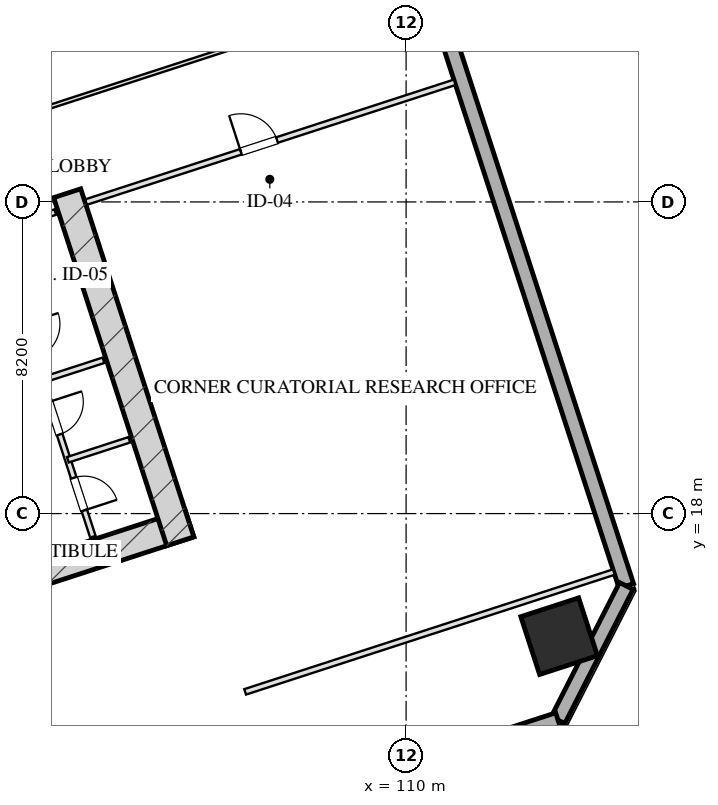
"""IFC4 building model, lengths in metres.
Left out: names, types, materials, properties, quantities, classifications, styles, units other than length and angle.
Written with IfcOpenShell. Run it as: python <this file> out.ifc"""

import sys

from ifc_helpers import new_model, si_unit, direction, frame, frame_2d, origin, origin_2d, place, context, subcontext, project, spatial, rectangle, hollow_rectangle, extrude, element, fill, save


model = new_model("IFC4")
c1 = context("Model", 3, precision=1e-05, world=origin(), true_north=direction((0.0, 1.0)))
c2 = subcontext(c1, "Body", "Model", "MODEL_VIEW")
j1 = project(units=[si_unit("LENGTHUNIT", "METRE"), si_unit("PLANEANGLEUNIT", "RADIAN")], contexts=[c1])
p1 = place(None, origin())
s1 = spatial("IfcSite", under=j1, at=p1, CompositionType="ELEMENT")
p2 = place(p1, origin())
s2 = spatial("IfcBuilding", under=s1, at=p2, CompositionType="ELEMENT")
p3 = place(p2, frame((0.0, 0.0, 50.6)))
s3 = spatial("IfcBuildingStorey", under=s2, at=p3, CompositionType="ELEMENT", Elevation=50.6)
p4 = place(p3, frame((88.559, 12.629, 0.0), z_axis=(0.0, 0.0, 1.0), x_axis=(0.951056072937, 0.309018358888, 0.0)))
e1 = element("IfcWall", 1, at=p4, inside=s3, PredefinedType="SHEAR", context=c2, shape_type="SweptSolid", body=[
    extrude(rectangle(XDim=16.55, YDim=0.75, at=frame_2d((8.275, 0.0))), origin(), (0.0, 0.0, 1.0), 3.45),
])
p5 = place(p3, frame((101.082, 26.429, 0.0), z_axis=(0.0, 0.0, 1.0), x_axis=(0.309016134813, -0.951056795583, 0.0)))
e2 = element("IfcWall", 2, at=p5, inside=s3, PredefinedType="SHEAR", context=c2, shape_type="SweptSolid", body=[
    extrude(rectangle(XDim=9.63, YDim=0.75, at=frame_2d((4.815, 0.0))), origin(), (0.0, 0.0, 1.0), 3.45),
])
p6 = place(p3, frame((114.027, 14.774, 0.0), z_axis=(0.0, 0.0, 1.0), x_axis=(0.951056516295, 0.309016994375, 0.0)))
e3 = element("IfcColumn", 3, at=p6, inside=s3, PredefinedType="COLUMN", context=c2, shape_type="SweptSolid", body=[
    extrude(hollow_rectangle(XDim=1.6, YDim=1.6, WallThickness=0.055, at=origin_2d()), origin(), (0.0, 0.0, 1.0), 3.451),
])
p7 = place(p3, frame((100.345, 63.648, 0.0), z_axis=(0.0, 0.0, 1.0), x_axis=(0.309014526607, -0.951057318118, 0.0)))
e4 = element("IfcWall", 4, at=p7, inside=s3, PredefinedType="SOLIDWALL", context=c2, shape_type="SweptSolid", body=[
    extrude(rectangle(XDim=50.0, YDim=0.4, at=frame_2d((25.0, 0.0))), origin(), (0.0, 0.0, 1.0), 2.61),
])
p8 = place(p7, frame((30.15, 0.0, 0.75)))
e5 = element("IfcOpeningElement", 5, at=p8, cuts=e4, PredefinedType="OPENING", context=c2, shape_type="SweptSolid", body=[
    extrude(rectangle(XDim=2.5, YDim=1.46, at=frame_2d((1.25, 0.73))), frame((0.0, 0.21, 0.0), z_axis=(0.0, -1.0, 0.0), x_axis=(1.0, 0.0, 0.0)), (0.0, 0.0, 1.0), 0.42),
])
p9 = place(p7, frame((18.65, 0.0, 0.0)))
e6 = element("IfcOpeningElement", 6, at=p9, cuts=e4, PredefinedType="OPENING", context=c2, shape_type="SweptSolid", body=[
    extrude(rectangle(XDim=1.1, YDim=2.15, at=frame_2d((0.55, 1.075))), frame((0.0, 0.21, 0.0), z_axis=(0.0, -1.0, 0.0), x_axis=(1.0, 0.0, 0.0)), (0.0, 0.0, 1.0), 0.42),
])
p10 = place(p3, frame((115.795, 16.095, 0.0), z_axis=(0.0, 0.0, 1.0), x_axis=(-0.453958106755, -0.891023028497, 0.0)))
e7 = element("IfcWall", 7, at=p10, inside=s3, PredefinedType="SOLIDWALL", context=c2, shape_type="SweptSolid", body=[
    extrude(rectangle(XDim=3.96, YDim=0.4, at=frame_2d((1.98, 0.0))), origin(), (0.0, 0.0, 1.0), 2.61),
])
p11 = place(p3, frame((113.998, 12.567, 0.0), z_axis=(0.0, 0.0, 1.0), x_axis=(-0.951055939317, -0.309018770125, 0.0)))
e8 = element("IfcWall", 8, at=p11, inside=s3, PredefinedType="SOLIDWALL", context=c2, shape_type="SweptSolid", body=[
    extrude(rectangle(XDim=32.4, YDim=0.4, at=frame_2d((16.2, 0.0))), origin(), (0.0, 0.0, 1.0), 2.61),
])
p12 = place(p3, frame((97.727, 24.944, 0.0), z_axis=(0.0, 0.0, 1.0), x_axis=(0.951036872128, 0.309077446369, 0.0)))
e9 = element("IfcWall", 9, at=p12, inside=s3, PredefinedType="PARTITIONING", context=c2, shape_type="SweptSolid", body=[
    extrude(rectangle(XDim=3.2, YDim=0.15, at=frame_2d((1.6, 0.0))), origin(), (0.0, 0.0, 1.0), 3.175),
])
p13 = place(p12, frame((0.22, 0.0, 0.0)))
e10 = element("IfcOpeningElement", 10, at=p13, cuts=e9, PredefinedType="OPENING", context=c2, shape_type="SweptSolid", body=[
    extrude(rectangle(XDim=0.95, YDim=2.05, at=frame_2d((0.475, 1.025))), frame((0.0, 0.085, 0.0), z_axis=(0.0, -1.0, 0.0), x_axis=(1.0, 0.0, 0.0)), (0.0, 0.0, 1.0), 0.17),
])
p14 = place(p3, frame((99.153, 25.408, 0.0), z_axis=(0.0, 0.0, 1.0), x_axis=(0.309016001439, -0.951056838919, 0.0)))
e11 = element("IfcWall", 11, at=p14, inside=s3, PredefinedType="PARTITIONING", context=c2, shape_type="SweptSolid", body=[
    extrude(rectangle(XDim=8.43, YDim=0.15, at=frame_2d((4.215, 0.0))), origin(), (0.0, 0.0, 1.0), 3.175),
])
p15 = place(p14, frame((2.55, 0.0, 0.0)))
e12 = element("IfcOpeningElement", 12, at=p15, cuts=e11, PredefinedType="OPENING", context=c2, shape_type="SweptSolid", body=[
    extrude(rectangle(XDim=0.95, YDim=2.05, at=frame_2d((0.475, 1.025))), frame((0.0, 0.085, 0.0), z_axis=(0.0, -1.0, 0.0), x_axis=(1.0, 0.0, 0.0)), (0.0, 0.0, 1.0), 0.17),
])
p16 = place(p14, frame((4.7, 0.0, 0.0)))
e13 = element("IfcOpeningElement", 13, at=p16, cuts=e11, PredefinedType="OPENING", context=c2, shape_type="SweptSolid", body=[
    extrude(rectangle(XDim=0.9, YDim=2.05, at=frame_2d((0.45, 1.025))), frame((0.0, 0.085, 0.0), z_axis=(0.0, -1.0, 0.0), x_axis=(1.0, 0.0, 0.0)), (0.0, 0.0, 1.0), 0.17),
])
p17 = place(p14, frame((6.8, 0.0, 0.0)))
e14 = element("IfcOpeningElement", 14, at=p17, cuts=e11, PredefinedType="OPENING", context=c2, shape_type="SweptSolid", body=[
    extrude(rectangle(XDim=0.9, YDim=2.05, at=frame_2d((0.45, 1.025))), frame((0.0, 0.085, 0.0), z_axis=(0.0, -1.0, 0.0), x_axis=(1.0, 0.0, 0.0)), (0.0, 0.0, 1.0), 0.17),
])
p18 = place(p3, frame((100.42, 21.509, 0.0), z_axis=(0.0, 0.0, 1.0), x_axis=(0.951040401051, 0.309066587596, 0.0)))
e15 = element("IfcWall", 15, at=p18, inside=s3, PredefinedType="PARTITIONING", context=c2, shape_type="SweptSolid", body=[
    extrude(rectangle(XDim=1.7, YDim=0.15, at=frame_2d((0.85, 0.0))), origin(), (0.0, 0.0, 1.0), 3.175),
])
p19 = place(p3, frame((101.1, 19.416, 0.0), z_axis=(0.0, 0.0, 1.0), x_axis=(0.951054116971, 0.309024378638, 0.0)))
e16 = element("IfcWall", 16, at=p19, inside=s3, PredefinedType="PARTITIONING", context=c2, shape_type="SweptSolid", body=[
    extrude(rectangle(XDim=1.7, YDim=0.15, at=frame_2d((0.85, 0.0))), origin(), (0.0, 0.0, 1.0), 3.175),
])
p20 = place(p3, frame((105.765, 13.309, 0.0), z_axis=(0.0, 0.0, 1.0), x_axis=(0.951054294345, 0.309023832749, 0.0)))
e17 = element("IfcWall", 17, at=p20, inside=s3, PredefinedType="PARTITIONING", context=c2, shape_type="SweptSolid", body=[
    extrude(rectangle(XDim=10.2, YDim=0.15, at=frame_2d((5.1, 0.0))), origin(), (0.0, 0.0, 1.0), 3.175),
])
p21 = place(p3, frame((101.578, 26.196, 0.0), z_axis=(0.0, 0.0, 1.0), x_axis=(0.951059043131, 0.309009217467, 0.0)))
e18 = element("IfcWall", 18, at=p21, inside=s3, PredefinedType="PARTITIONING", context=c2, shape_type="SweptSolid", body=[
    extrude(rectangle(XDim=10.2, YDim=0.15, at=frame_2d((5.1, 0.0))), origin(), (0.0, 0.0, 1.0), 3.175),
])
p22 = place(p21, frame((4.284, 0.0, 0.0)))
e19 = element("IfcOpeningElement", 19, at=p22, cuts=e18, PredefinedType="OPENING", context=c2, shape_type="SweptSolid", body=[
    extrude(rectangle(XDim=1.0, YDim=2.05, at=frame_2d((0.5, 1.025))), frame((0.0, 0.085, 0.0), z_axis=(0.0, -1.0, 0.0), x_axis=(1.0, 0.0, 0.0)), (0.0, 0.0, 1.0), 0.17),
])
p23 = place(p3, frame((96.304, 27.3, 0.0), z_axis=(0.0, 0.0, 1.0), x_axis=(0.951055535739, 0.309020012199, 0.0)))
e20 = element("IfcWall", 20, at=p23, inside=s3, PredefinedType="MOVABLE", context=c2, shape_type="SweptSolid", body=[
    extrude(rectangle(XDim=14.875, YDim=0.1, at=frame_2d((7.438, 0.0))), origin(), (0.0, 0.0, 1.0), 3.175),
])
p24 = place(p16, origin())
e21 = element("IfcDoor", 21, at=p24, inside=s3, OperationType="SINGLE_SWING_LEFT", PredefinedType="DOOR", context=c2, shape_type="SweptSolid", body=[
    extrude(rectangle(XDim=0.9, YDim=2.05, at=frame_2d((0.45, 1.025))), frame((0.0, 0.025, 0.0), z_axis=(0.0, -1.0, 0.0), x_axis=(1.0, 0.0, 0.0)), (0.0, 0.0, 1.0), 0.05),
])
fill(e13, e21)
p25 = place(p17, origin())
e22 = element("IfcDoor", 22, at=p25, inside=s3, OperationType="SINGLE_SWING_RIGHT", PredefinedType="DOOR", context=c2, shape_type="SweptSolid", body=[
    extrude(rectangle(XDim=0.9, YDim=2.05, at=frame_2d((0.45, 1.025))), frame((0.0, 0.025, 0.0), z_axis=(0.0, -1.0, 0.0), x_axis=(1.0, 0.0, 0.0)), (0.0, 0.0, 1.0), 0.05),
])
fill(e14, e22)
p26 = place(p22, origin())
e23 = element("IfcDoor", 23, at=p26, inside=s3, OperationType="SINGLE_SWING_LEFT", PredefinedType="DOOR", context=c2, shape_type="SweptSolid", body=[
    extrude(rectangle(XDim=1.0, YDim=2.05, at=frame_2d((0.5, 1.025))), frame((0.0, 0.025, 0.0), z_axis=(0.0, -1.0, 0.0), x_axis=(1.0, 0.0, 0.0)), (0.0, 0.0, 1.0), 0.05),
])
fill(e19, e23)
save(model, sys.argv[1])
